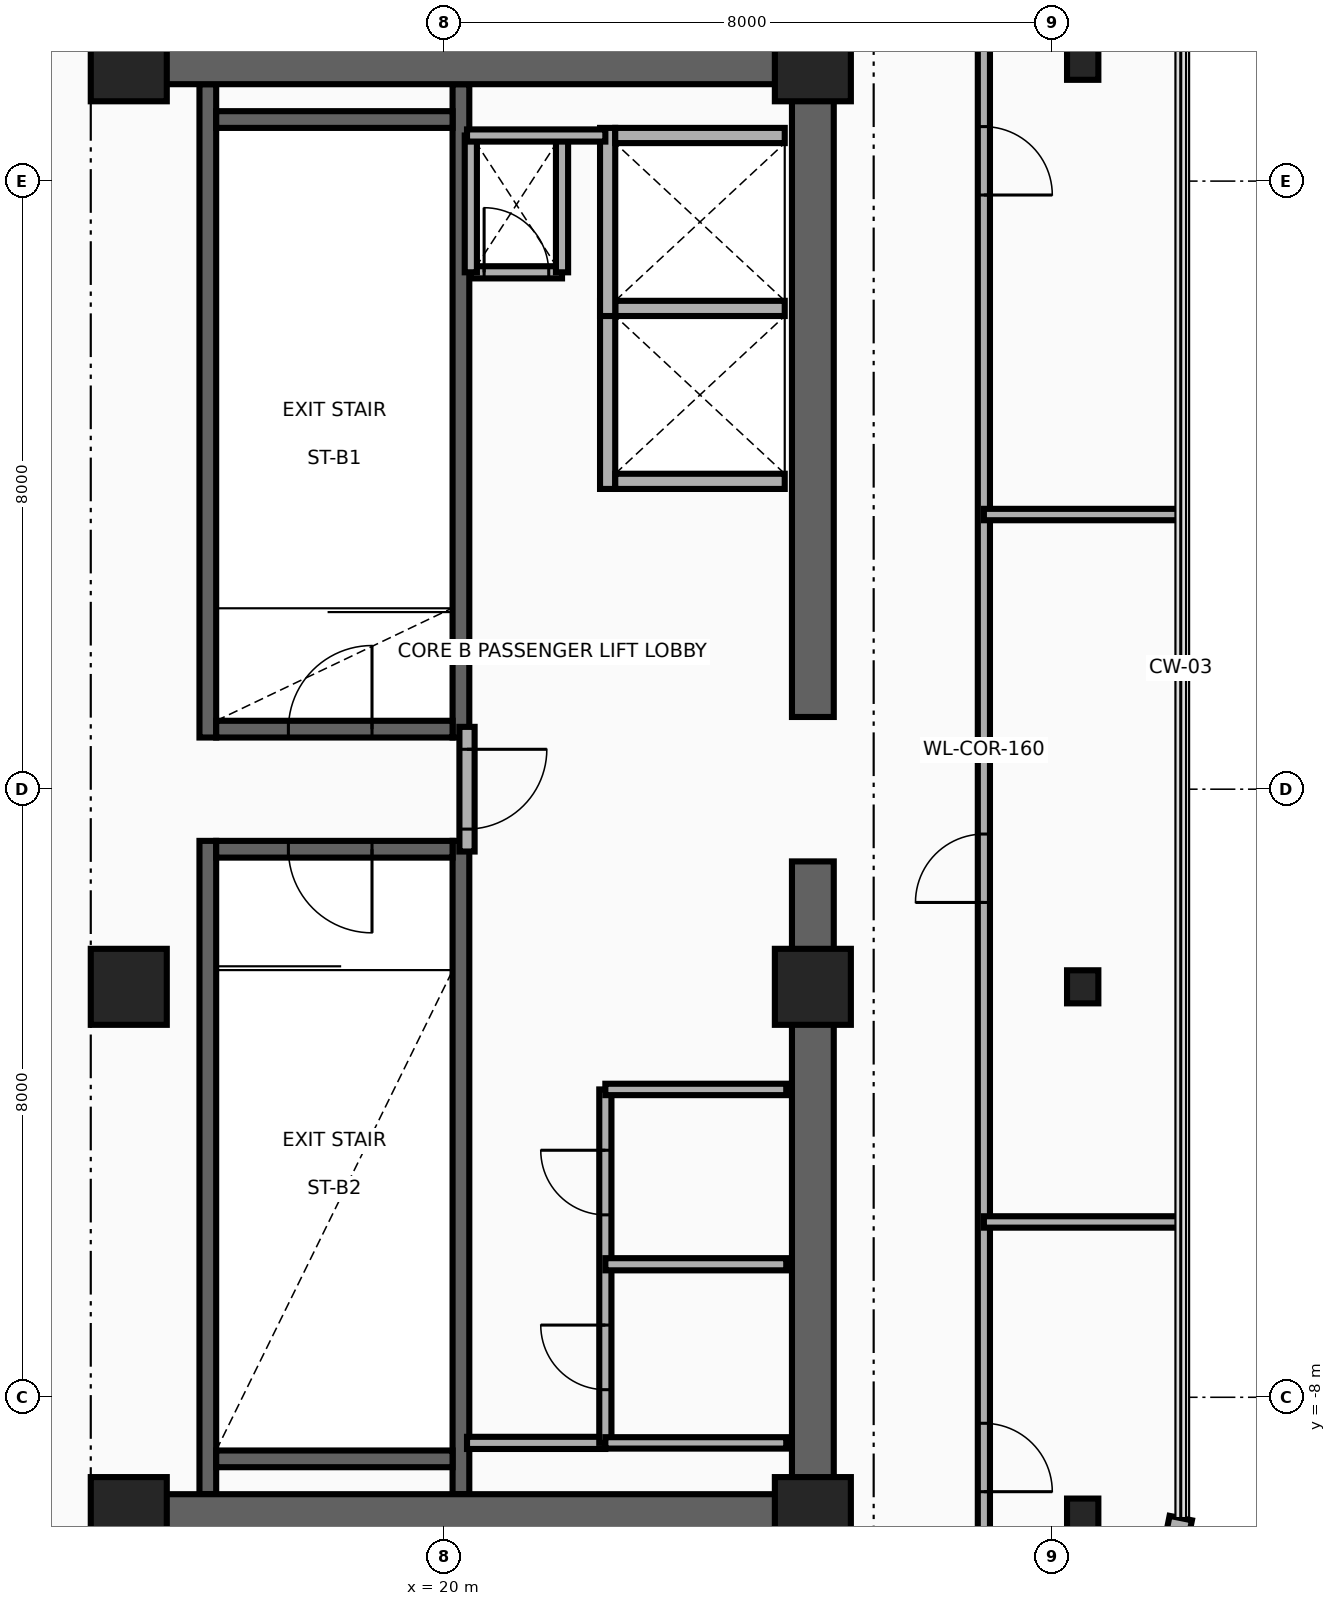
"""IFC4 building model, lengths in metres.
Left out: names, types, materials, properties, quantities, classifications, styles, units other than length and angle.
Written with IfcOpenShell. Run it as: python <this file> out.ifc"""

import sys

from ifc_helpers import new_model, si_unit, direction, frame, frame_2d, origin, origin_2d, place, context, subcontext, project, spatial, rectangle, i_section, extrude, source, transform, mapped, element, fill, save


model = new_model("IFC4")
c1 = context("Model", 3, precision=1e-05, world=origin(), true_north=direction((0.0, 1.0)))
c2 = subcontext(c1, "Body", "Model", "MODEL_VIEW")
j1 = project(units=[si_unit("LENGTHUNIT", "METRE"), si_unit("PLANEANGLEUNIT", "RADIAN")], contexts=[c1])
p1 = place(None, origin())
s1 = spatial("IfcSite", under=j1, at=p1, CompositionType="ELEMENT")
p2 = place(p1, origin())
s2 = spatial("IfcBuilding", under=s1, at=p2, CompositionType="ELEMENT")
p3 = place(p2, frame((0.0, 0.0, 192.35)))
s3 = spatial("IfcBuildingStorey", under=s2, at=p3, CompositionType="ELEMENT", Elevation=192.35)
for number, where, z_axis, x_axis in (
    (1, (16.89, 0.68, 0.0), (0.0, 0.0, 1.0), (0.0, 1.0, 0.0)),
    (2, (20.22, 0.68, 0.0), (0.0, 0.0, 1.0), (0.0, 1.0, 0.0)),
):
    element("IfcWall", number, at=place(p3, frame(where, z_axis=z_axis, x_axis=x_axis)), inside=s3, PredefinedType="SHEAR", context=c2, shape_type="SweptSolid", body=[
        extrude(rectangle(XDim=8.595, YDim=0.22, at=frame_2d((4.297, 0.0))), origin(), (0.0, 0.0, 1.0), 3.71),
    ])
p4 = place(p3, frame((17.0, 0.79, 0.0), z_axis=(0.0, 0.0, 1.0), x_axis=(1.0, 0.0, 0.0)))
e3 = element("IfcWall", 3, at=p4, inside=s3, PredefinedType="SHEAR", context=c2, shape_type="SweptSolid", body=[
    extrude(rectangle(XDim=3.11, YDim=0.22, at=frame_2d((1.555, 0.0))), origin(), (0.0, 0.0, 1.0), 3.71),
])
p5 = place(p4, frame((0.95, 0.0, 0.0)))
e4 = element("IfcOpeningElement", 4, at=p5, cuts=e3, PredefinedType="OPENING", context=c2, shape_type="SweptSolid", body=[
    extrude(rectangle(XDim=1.1, YDim=2.15, at=frame_2d((0.55, 1.075))), frame((0.0, 0.125, 0.0), z_axis=(0.0, -1.0, 0.0), x_axis=(1.0, 0.0, 0.0)), (0.0, 0.0, 1.0), 0.25),
])
p6 = place(p3, frame((17.0, 8.81, 0.0), z_axis=(0.0, 0.0, 1.0), x_axis=(1.0, 0.0, 0.0)))
e5 = element("IfcWall", 5, at=p6, inside=s3, PredefinedType="SHEAR", context=c2, shape_type="SweptSolid", body=[
    extrude(rectangle(XDim=3.11, YDim=0.22, at=frame_2d((1.555, 0.0))), origin(), (0.0, 0.0, 1.0), 3.71),
])
for number, where, z_axis, x_axis in (
    (6, (16.89, -9.275, 0.0), (0.0, 0.0, 1.0), (0.0, 1.0, 0.0)),
    (7, (20.22, -9.275, 0.0), (0.0, 0.0, 1.0), (0.0, 1.0, 0.0)),
):
    element("IfcWall", number, at=place(p3, frame(where, z_axis=z_axis, x_axis=x_axis)), inside=s3, PredefinedType="SHEAR", context=c2, shape_type="SweptSolid", body=[
        extrude(rectangle(XDim=8.595, YDim=0.22, at=frame_2d((4.297, 0.0))), origin(), (0.0, 0.0, 1.0), 3.71),
    ])
p7 = place(p3, frame((17.0, -8.81, 0.0), z_axis=(0.0, 0.0, 1.0), x_axis=(1.0, 0.0, 0.0)))
e8 = element("IfcWall", 8, at=p7, inside=s3, PredefinedType="SHEAR", context=c2, shape_type="SweptSolid", body=[
    extrude(rectangle(XDim=3.11, YDim=0.22, at=frame_2d((1.555, 0.0))), origin(), (0.0, 0.0, 1.0), 3.71),
])
p8 = place(p3, frame((17.0, -0.79, 0.0), z_axis=(0.0, 0.0, 1.0), x_axis=(1.0, 0.0, 0.0)))
e9 = element("IfcWall", 9, at=p8, inside=s3, PredefinedType="SHEAR", context=c2, shape_type="SweptSolid", body=[
    extrude(rectangle(XDim=3.11, YDim=0.22, at=frame_2d((1.555, 0.0))), origin(), (0.0, 0.0, 1.0), 3.71),
])
p9 = place(p8, frame((0.95, 0.0, 0.0)))
e10 = element("IfcOpeningElement", 10, at=p9, cuts=e9, PredefinedType="OPENING", context=c2, shape_type="SweptSolid", body=[
    extrude(rectangle(XDim=1.1, YDim=2.15, at=frame_2d((0.55, 1.075))), frame((0.0, 0.125, 0.0), z_axis=(0.0, -1.0, 0.0), x_axis=(1.0, 0.0, 0.0)), (0.0, 0.0, 1.0), 0.25),
])
for number, where, z_axis, x_axis in (
    (11, (24.85, -9.825, 0.0), (0.0, 0.0, 1.0), (0.0, 1.0, 0.0)),
    (12, (24.85, 0.95, 0.0), (0.0, 0.0, 1.0), (0.0, 1.0, 0.0)),
):
    element("IfcWall", number, at=place(p3, frame(where, z_axis=z_axis, x_axis=x_axis)), inside=s3, PredefinedType="SHEAR", context=c2, shape_type="SweptSolid", body=[
        extrude(rectangle(XDim=8.875, YDim=0.55, at=frame_2d((4.438, 0.0))), origin(), (0.0, 0.0, 1.0), 3.71),
    ])
for number, where, z_axis, x_axis in (
    (13, (15.85, 9.55, 0.0), (0.0, 0.0, 1.0), (1.0, 0.0, 0.0)),
    (14, (15.85, -9.55, 0.0), (0.0, 0.0, 1.0), (1.0, 0.0, 0.0)),
):
    element("IfcWall", number, at=place(p3, frame(where, z_axis=z_axis, x_axis=x_axis)), inside=s3, PredefinedType="SHEAR", context=c2, shape_type="SweptSolid", body=[
        extrude(rectangle(XDim=9.0, YDim=0.55, at=frame_2d((4.5, 0.0))), origin(), (0.0, 0.0, 1.0), 3.71),
    ])
m1 = source(origin(), c2, "Body", "SweptSolid", [
    extrude(rectangle(XDim=1.0, YDim=1.0, at=origin_2d()), origin(), (0.0, 0.0, 1.0), 3.95),
])
for number, where, z_axis, x_axis in (
    (15, (15.85, -9.55, 0.0), (0.0, 0.0, 1.0), (1.0, 0.0, 0.0)),
    (16, (24.85, -9.55, 0.0), (0.0, 0.0, 1.0), (1.0, 0.0, 0.0)),
):
    element("IfcColumn", number, at=place(p3, frame(where, z_axis=z_axis, x_axis=x_axis)), inside=s3, PredefinedType="COLUMN", context=c2, shape_type="MappedRepresentation", body=[
        mapped(m1, transform((0.0, 0.0, 0.0), x_axis=(1.0, 0.0, 0.0), y_axis=(0.0, 1.0, 0.0), z_axis=(0.0, 0.0, 1.0), scale=1.0)),
    ])
m2 = source(origin(), c2, "Body", "SweptSolid", [
    extrude(i_section(OverallWidth=0.412, OverallDepth=0.435, WebThickness=0.036, FlangeThickness=0.057, at=origin_2d()), origin(), (0.0, 0.0, 1.0), 3.95),
])
p10 = place(p3, frame((28.4, -9.55, 0.0), z_axis=(0.0, 0.0, 1.0), x_axis=(1.0, 0.0, 0.0)))
e17 = element("IfcColumn", 17, at=p10, inside=s3, PredefinedType="COLUMN", context=c2, shape_type="MappedRepresentation", body=[
    mapped(m2, transform((0.0, 0.0, 0.0), x_axis=(1.0, 0.0, 0.0), y_axis=(0.0, 1.0, 0.0), z_axis=(0.0, 0.0, 1.0), scale=1.0)),
])
for number, where, z_axis, x_axis in (
    (18, (15.85, -2.6, 0.0), (0.0, 0.0, 1.0), (1.0, 0.0, 0.0)),
    (19, (24.85, -2.6, 0.0), (0.0, 0.0, 1.0), (1.0, 0.0, 0.0)),
):
    element("IfcColumn", number, at=place(p3, frame(where, z_axis=z_axis, x_axis=x_axis)), inside=s3, PredefinedType="COLUMN", context=c2, shape_type="MappedRepresentation", body=[
        mapped(m1, transform((0.0, 0.0, 0.0), x_axis=(1.0, 0.0, 0.0), y_axis=(0.0, 1.0, 0.0), z_axis=(0.0, 0.0, 1.0), scale=1.0)),
    ])
p11 = place(p3, frame((28.4, -2.6, 0.0), z_axis=(0.0, 0.0, 1.0), x_axis=(1.0, 0.0, 0.0)))
e20 = element("IfcColumn", 20, at=p11, inside=s3, PredefinedType="COLUMN", context=c2, shape_type="MappedRepresentation", body=[
    mapped(m2, transform((0.0, 0.0, 0.0), x_axis=(1.0, 0.0, 0.0), y_axis=(0.0, 1.0, 0.0), z_axis=(0.0, 0.0, 1.0), scale=1.0)),
])
for number, where, z_axis, x_axis in (
    (21, (15.85, 9.55, 0.0), (0.0, 0.0, 1.0), (1.0, 0.0, 0.0)),
    (22, (24.85, 9.55, 0.0), (0.0, 0.0, 1.0), (1.0, 0.0, 0.0)),
):
    element("IfcColumn", number, at=place(p3, frame(where, z_axis=z_axis, x_axis=x_axis)), inside=s3, PredefinedType="COLUMN", context=c2, shape_type="MappedRepresentation", body=[
        mapped(m1, transform((0.0, 0.0, 0.0), x_axis=(1.0, 0.0, 0.0), y_axis=(0.0, 1.0, 0.0), z_axis=(0.0, 0.0, 1.0), scale=1.0)),
    ])
p12 = place(p3, frame((28.4, 9.55, 0.0), z_axis=(0.0, 0.0, 1.0), x_axis=(1.0, 0.0, 0.0)))
e23 = element("IfcColumn", 23, at=p12, inside=s3, PredefinedType="COLUMN", context=c2, shape_type="MappedRepresentation", body=[
    mapped(m2, transform((0.0, 0.0, 0.0), x_axis=(1.0, 0.0, 0.0), y_axis=(0.0, 1.0, 0.0), z_axis=(0.0, 0.0, 1.0), scale=1.0)),
])
p13 = place(p3, frame((29.69, -9.589, 0.0), z_axis=(0.0, 0.0, 1.0), x_axis=(-0.195025152871, -0.980798241101, 0.0)))
e24 = element("IfcWall", 24, at=p13, inside=s3, PredefinedType="SOLIDWALL", context=c2, shape_type="SweptSolid", body=[
    extrude(rectangle(XDim=0.904, YDim=0.3, at=frame_2d((0.452, 0.0))), origin(), (0.0, 0.0, 1.0), 3.71),
])
p14 = place(p3, frame((22.15, 3.95, 0.0), z_axis=(0.0, 0.0, 1.0), x_axis=(0.0, 1.0, 0.0)))
e25 = element("IfcWall", 25, at=p14, inside=s3, PredefinedType="MOVABLE", context=c2, shape_type="SweptSolid", body=[
    extrude(rectangle(XDim=2.475, YDim=0.2, at=frame_2d((1.238, 0.0))), origin(), (0.0, 0.0, 1.0), 3.71),
])
for number, where, z_axis, x_axis in (
    (26, (22.25, 4.05, 0.0), (0.0, 0.0, 1.0), (1.0, 0.0, 0.0)),
    (27, (22.25, 6.325, 0.0), (0.0, 0.0, 1.0), (1.0, 0.0, 0.0)),
):
    element("IfcWall", number, at=place(p3, frame(where, z_axis=z_axis, x_axis=x_axis)), inside=s3, PredefinedType="MOVABLE", context=c2, shape_type="SweptSolid", body=[
        extrude(rectangle(XDim=2.23, YDim=0.2, at=frame_2d((1.115, 0.0))), origin(), (0.0, 0.0, 1.0), 3.71),
    ])
p15 = place(p3, frame((22.15, 6.225, 0.0), z_axis=(0.0, 0.0, 1.0), x_axis=(0.0, 1.0, 0.0)))
e28 = element("IfcWall", 28, at=p15, inside=s3, PredefinedType="MOVABLE", context=c2, shape_type="SweptSolid", body=[
    extrude(rectangle(XDim=2.475, YDim=0.2, at=frame_2d((1.237, 0.0))), origin(), (0.0, 0.0, 1.0), 3.71),
])
p16 = place(p3, frame((22.25, 8.6, 0.0), z_axis=(0.0, 0.0, 1.0), x_axis=(1.0, 0.0, 0.0)))
e29 = element("IfcWall", 29, at=p16, inside=s3, PredefinedType="MOVABLE", context=c2, shape_type="SweptSolid", body=[
    extrude(rectangle(XDim=2.23, YDim=0.2, at=frame_2d((1.115, 0.0))), origin(), (0.0, 0.0, 1.0), 3.71),
])
p17 = place(p3, frame((20.3, -0.82, 0.0), z_axis=(0.0, 0.0, 1.0), x_axis=(0.0, 1.0, 0.0)))
e30 = element("IfcWall", 30, at=p17, inside=s3, PredefinedType="PARTITIONING", context=c2, shape_type="SweptSolid", body=[
    extrude(rectangle(XDim=1.64, YDim=0.2, at=frame_2d((0.82, 0.0))), origin(), (0.0, 0.0, 1.0), 3.71),
])
p18 = place(p17, frame((0.295, 0.0, 0.0)))
e31 = element("IfcOpeningElement", 31, at=p18, cuts=e30, PredefinedType="OPENING", context=c2, shape_type="SweptSolid", body=[
    extrude(rectangle(XDim=1.05, YDim=2.15, at=frame_2d((0.525, 1.075))), frame((0.0, 0.115, 0.0), z_axis=(0.0, -1.0, 0.0), x_axis=(1.0, 0.0, 0.0)), (0.0, 0.0, 1.0), 0.23),
])
p19 = place(p3, frame((20.35, 6.8, 0.0), z_axis=(0.0, 0.0, 1.0), x_axis=(1.0, 0.0, 0.0)))
e32 = element("IfcWall", 32, at=p19, inside=s3, PredefinedType="PARTITIONING", context=c2, shape_type="SweptSolid", body=[
    extrude(rectangle(XDim=1.2, YDim=0.16, at=frame_2d((0.6, 0.0))), origin(), (0.0, 0.0, 1.0), 3.71),
])
p20 = place(p19, frame((0.175, 0.0, 0.0)))
e33 = element("IfcOpeningElement", 33, at=p20, cuts=e32, PredefinedType="OPENING", context=c2, shape_type="SweptSolid", body=[
    extrude(rectangle(XDim=0.85, YDim=2.05, at=frame_2d((0.425, 1.025))), frame((0.0, 0.095, 0.0), z_axis=(0.0, -1.0, 0.0), x_axis=(1.0, 0.0, 0.0)), (0.0, 0.0, 1.0), 0.19),
])
for number, where, z_axis, x_axis in (
    (34, (21.55, 6.8, 0.0), (0.0, 0.0, 1.0), (0.0, 1.0, 0.0)),
    (35, (20.35, 6.8, 0.0), (0.0, 0.0, 1.0), (0.0, 1.0, 0.0)),
):
    element("IfcWall", number, at=place(p3, frame(where, z_axis=z_axis, x_axis=x_axis)), inside=s3, PredefinedType="PARTITIONING", context=c2, shape_type="SweptSolid", body=[
        extrude(rectangle(XDim=1.8, YDim=0.16, at=frame_2d((0.9, 0.0))), origin(), (0.0, 0.0, 1.0), 3.71),
    ])
for number, where, z_axis, x_axis in (
    (36, (20.3, -8.6, 0.0), (0.0, 0.0, 1.0), (1.0, 0.0, 0.0)),
    (37, (20.3, 8.6, 0.0), (0.0, 0.0, 1.0), (1.0, 0.0, 0.0)),
):
    element("IfcWall", number, at=place(p3, frame(where, z_axis=z_axis, x_axis=x_axis)), inside=s3, PredefinedType="PARTITIONING", context=c2, shape_type="SweptSolid", body=[
        extrude(rectangle(XDim=1.82, YDim=0.16, at=frame_2d((0.91, 0.0))), origin(), (0.0, 0.0, 1.0), 3.71),
    ])
p21 = place(p3, frame((22.12, -8.6, 0.0), z_axis=(0.0, 0.0, 1.0), x_axis=(0.0, 1.0, 0.0)))
e38 = element("IfcWall", 38, at=p21, inside=s3, PredefinedType="PARTITIONING", context=c2, shape_type="SweptSolid", body=[
    extrude(rectangle(XDim=4.65, YDim=0.16, at=frame_2d((2.325, 0.0))), origin(), (0.0, 0.0, 1.0), 3.71),
])
p22 = place(p21, frame((0.7, 0.0, 0.0)))
e39 = element("IfcOpeningElement", 39, at=p22, cuts=e38, PredefinedType="OPENING", context=c2, shape_type="SweptSolid", body=[
    extrude(rectangle(XDim=0.85, YDim=2.05, at=frame_2d((0.425, 1.025))), frame((0.0, 0.095, 0.0), z_axis=(0.0, -1.0, 0.0), x_axis=(1.0, 0.0, 0.0)), (0.0, 0.0, 1.0), 0.19),
])
p23 = place(p21, frame((3.0, 0.0, 0.0)))
e40 = element("IfcOpeningElement", 40, at=p23, cuts=e38, PredefinedType="OPENING", context=c2, shape_type="SweptSolid", body=[
    extrude(rectangle(XDim=0.85, YDim=2.05, at=frame_2d((0.425, 1.025))), frame((0.0, 0.095, 0.0), z_axis=(0.0, -1.0, 0.0), x_axis=(1.0, 0.0, 0.0)), (0.0, 0.0, 1.0), 0.19),
])
for number, where, z_axis, x_axis in (
    (41, (22.12, -3.95, 0.0), (0.0, 0.0, 1.0), (1.0, 0.0, 0.0)),
    (42, (22.12, -8.6, 0.0), (0.0, 0.0, 1.0), (1.0, 0.0, 0.0)),
):
    element("IfcWall", number, at=place(p3, frame(where, z_axis=z_axis, x_axis=x_axis)), inside=s3, PredefinedType="PARTITIONING", context=c2, shape_type="SweptSolid", body=[
        extrude(rectangle(XDim=2.38, YDim=0.15, at=frame_2d((1.19, 0.0))), origin(), (0.0, 0.0, 1.0), 3.71),
    ])
p24 = place(p3, frame((22.12, -6.25, 0.0), z_axis=(0.0, 0.0, 1.0), x_axis=(1.0, 0.0, 0.0)))
e43 = element("IfcWall", 43, at=p24, inside=s3, PredefinedType="PARTITIONING", context=c2, shape_type="SweptSolid", body=[
    extrude(rectangle(XDim=2.38, YDim=0.16, at=frame_2d((1.19, 0.0))), origin(), (0.0, 0.0, 1.0), 3.71),
])
p25 = place(p3, frame((27.1, -11.89, 0.0), z_axis=(0.0, 0.0, 1.0), x_axis=(0.0, 1.0, 0.0)))
e44 = element("IfcWall", 44, at=p25, inside=s3, PredefinedType="PARTITIONING", context=c2, shape_type="SweptSolid", body=[
    extrude(rectangle(XDim=24.81, YDim=0.16, at=frame_2d((12.405, 0.0))), origin(), (0.0, 0.0, 1.0), 2.994),
])
p26 = place(p25, frame((2.648, 0.0, 0.0)))
e45 = element("IfcOpeningElement", 45, at=p26, cuts=e44, PredefinedType="OPENING", context=c2, shape_type="SweptSolid", body=[
    extrude(rectangle(XDim=0.9, YDim=2.1, at=frame_2d((0.45, 1.05))), frame((0.0, 0.095, 0.0), z_axis=(0.0, -1.0, 0.0), x_axis=(1.0, 0.0, 0.0)), (0.0, 0.0, 1.0), 0.19),
])
p27 = place(p25, frame((10.4, 0.0, 0.0)))
e46 = element("IfcOpeningElement", 46, at=p27, cuts=e44, PredefinedType="OPENING", context=c2, shape_type="SweptSolid", body=[
    extrude(rectangle(XDim=0.9, YDim=2.1, at=frame_2d((0.45, 1.05))), frame((0.0, 0.095, 0.0), z_axis=(0.0, -1.0, 0.0), x_axis=(1.0, 0.0, 0.0)), (0.0, 0.0, 1.0), 0.19),
])
p28 = place(p25, frame((19.707, 0.0, 0.0)))
e47 = element("IfcOpeningElement", 47, at=p28, cuts=e44, PredefinedType="OPENING", context=c2, shape_type="SweptSolid", body=[
    extrude(rectangle(XDim=0.9, YDim=2.1, at=frame_2d((0.45, 1.05))), frame((0.0, 0.095, 0.0), z_axis=(0.0, -1.0, 0.0), x_axis=(1.0, 0.0, 0.0)), (0.0, 0.0, 1.0), 0.19),
])
for number, where, z_axis, x_axis in (
    (48, (27.1, -5.693, 0.0), (0.0, 0.0, 1.0), (1.0, 0.0, 0.0)),
    (49, (27.1, 3.613, 0.0), (0.0, 0.0, 1.0), (1.0, 0.0, 0.0)),
):
    element("IfcWall", number, at=place(p3, frame(where, z_axis=z_axis, x_axis=x_axis)), inside=s3, PredefinedType="PARTITIONING", context=c2, shape_type="SweptSolid", body=[
        extrude(rectangle(XDim=2.59, YDim=0.15, at=frame_2d((1.295, 0.0))), origin(), (0.0, 0.0, 1.0), 3.156),
    ])
p29 = place(p18, frame((1.05, 0.0, 0.0), z_axis=(0.0, 0.0, 1.0), x_axis=(-1.0, 0.0, 0.0)))
e50 = element("IfcDoor", 50, at=p29, inside=s3, OperationType="SINGLE_SWING_LEFT", PredefinedType="DOOR", context=c2, shape_type="SweptSolid", body=[
    extrude(rectangle(XDim=1.05, YDim=2.15, at=frame_2d((0.525, 1.075))), frame((0.0, 0.025, 0.0), z_axis=(0.0, -1.0, 0.0), x_axis=(1.0, 0.0, 0.0)), (0.0, 0.0, 1.0), 0.05),
])
fill(e31, e50)
p30 = place(p5, origin())
e51 = element("IfcDoor", 51, at=p30, inside=s3, OperationType="SINGLE_SWING_RIGHT", PredefinedType="DOOR", context=c2, shape_type="SweptSolid", body=[
    extrude(rectangle(XDim=1.1, YDim=2.15, at=frame_2d((0.55, 1.075))), frame((0.0, 0.025, 0.0), z_axis=(0.0, -1.0, 0.0), x_axis=(1.0, 0.0, 0.0)), (0.0, 0.0, 1.0), 0.05),
])
fill(e4, e51)
p31 = place(p9, frame((1.1, 0.0, 0.0), z_axis=(0.0, 0.0, 1.0), x_axis=(-1.0, 0.0, 0.0)))
e52 = element("IfcDoor", 52, at=p31, inside=s3, OperationType="SINGLE_SWING_LEFT", PredefinedType="DOOR", context=c2, shape_type="SweptSolid", body=[
    extrude(rectangle(XDim=1.1, YDim=2.15, at=frame_2d((0.55, 1.075))), frame((0.0, 0.025, 0.0), z_axis=(0.0, -1.0, 0.0), x_axis=(1.0, 0.0, 0.0)), (0.0, 0.0, 1.0), 0.05),
])
fill(e10, e52)
p32 = place(p20, origin())
e53 = element("IfcDoor", 53, at=p32, inside=s3, OperationType="SINGLE_SWING_RIGHT", PredefinedType="DOOR", context=c2, shape_type="SweptSolid", body=[
    extrude(rectangle(XDim=0.85, YDim=2.05, at=frame_2d((0.425, 1.025))), frame((0.0, 0.025, 0.0), z_axis=(0.0, -1.0, 0.0), x_axis=(1.0, 0.0, 0.0)), (0.0, 0.0, 1.0), 0.05),
])
fill(e33, e53)
p33 = place(p22, origin())
e54 = element("IfcDoor", 54, at=p33, inside=s3, OperationType="SINGLE_SWING_LEFT", PredefinedType="DOOR", context=c2, shape_type="SweptSolid", body=[
    extrude(rectangle(XDim=0.85, YDim=2.05, at=frame_2d((0.425, 1.025))), frame((0.0, 0.025, 0.0), z_axis=(0.0, -1.0, 0.0), x_axis=(1.0, 0.0, 0.0)), (0.0, 0.0, 1.0), 0.05),
])
fill(e39, e54)
p34 = place(p23, origin())
e55 = element("IfcDoor", 55, at=p34, inside=s3, OperationType="SINGLE_SWING_RIGHT", PredefinedType="DOOR", context=c2, shape_type="SweptSolid", body=[
    extrude(rectangle(XDim=0.85, YDim=2.05, at=frame_2d((0.425, 1.025))), frame((0.0, 0.025, 0.0), z_axis=(0.0, -1.0, 0.0), x_axis=(1.0, 0.0, 0.0)), (0.0, 0.0, 1.0), 0.05),
])
fill(e40, e55)
p35 = place(p26, frame((0.9, 0.0, 0.0), z_axis=(0.0, 0.0, 1.0), x_axis=(-1.0, 0.0, 0.0)))
e56 = element("IfcDoor", 56, at=p35, inside=s3, OperationType="SINGLE_SWING_LEFT", PredefinedType="DOOR", context=c2, shape_type="SweptSolid", body=[
    extrude(rectangle(XDim=0.9, YDim=2.1, at=frame_2d((0.45, 1.05))), frame((0.0, 0.025, 0.0), z_axis=(0.0, -1.0, 0.0), x_axis=(1.0, 0.0, 0.0)), (0.0, 0.0, 1.0), 0.05),
])
fill(e45, e56)
p36 = place(p27, origin())
e57 = element("IfcDoor", 57, at=p36, inside=s3, OperationType="SINGLE_SWING_RIGHT", PredefinedType="DOOR", context=c2, shape_type="SweptSolid", body=[
    extrude(rectangle(XDim=0.9, YDim=2.1, at=frame_2d((0.45, 1.05))), frame((0.0, 0.025, 0.0), z_axis=(0.0, -1.0, 0.0), x_axis=(1.0, 0.0, 0.0)), (0.0, 0.0, 1.0), 0.05),
])
fill(e46, e57)
p37 = place(p28, frame((0.9, 0.0, 0.0), z_axis=(0.0, 0.0, 1.0), x_axis=(-1.0, 0.0, 0.0)))
e58 = element("IfcDoor", 58, at=p37, inside=s3, OperationType="SINGLE_SWING_LEFT", PredefinedType="DOOR", context=c2, shape_type="SweptSolid", body=[
    extrude(rectangle(XDim=0.9, YDim=2.1, at=frame_2d((0.45, 1.05))), frame((0.0, 0.025, 0.0), z_axis=(0.0, -1.0, 0.0), x_axis=(1.0, 0.0, 0.0)), (0.0, 0.0, 1.0), 0.05),
])
fill(e47, e58)
save(model, sys.argv[1])
